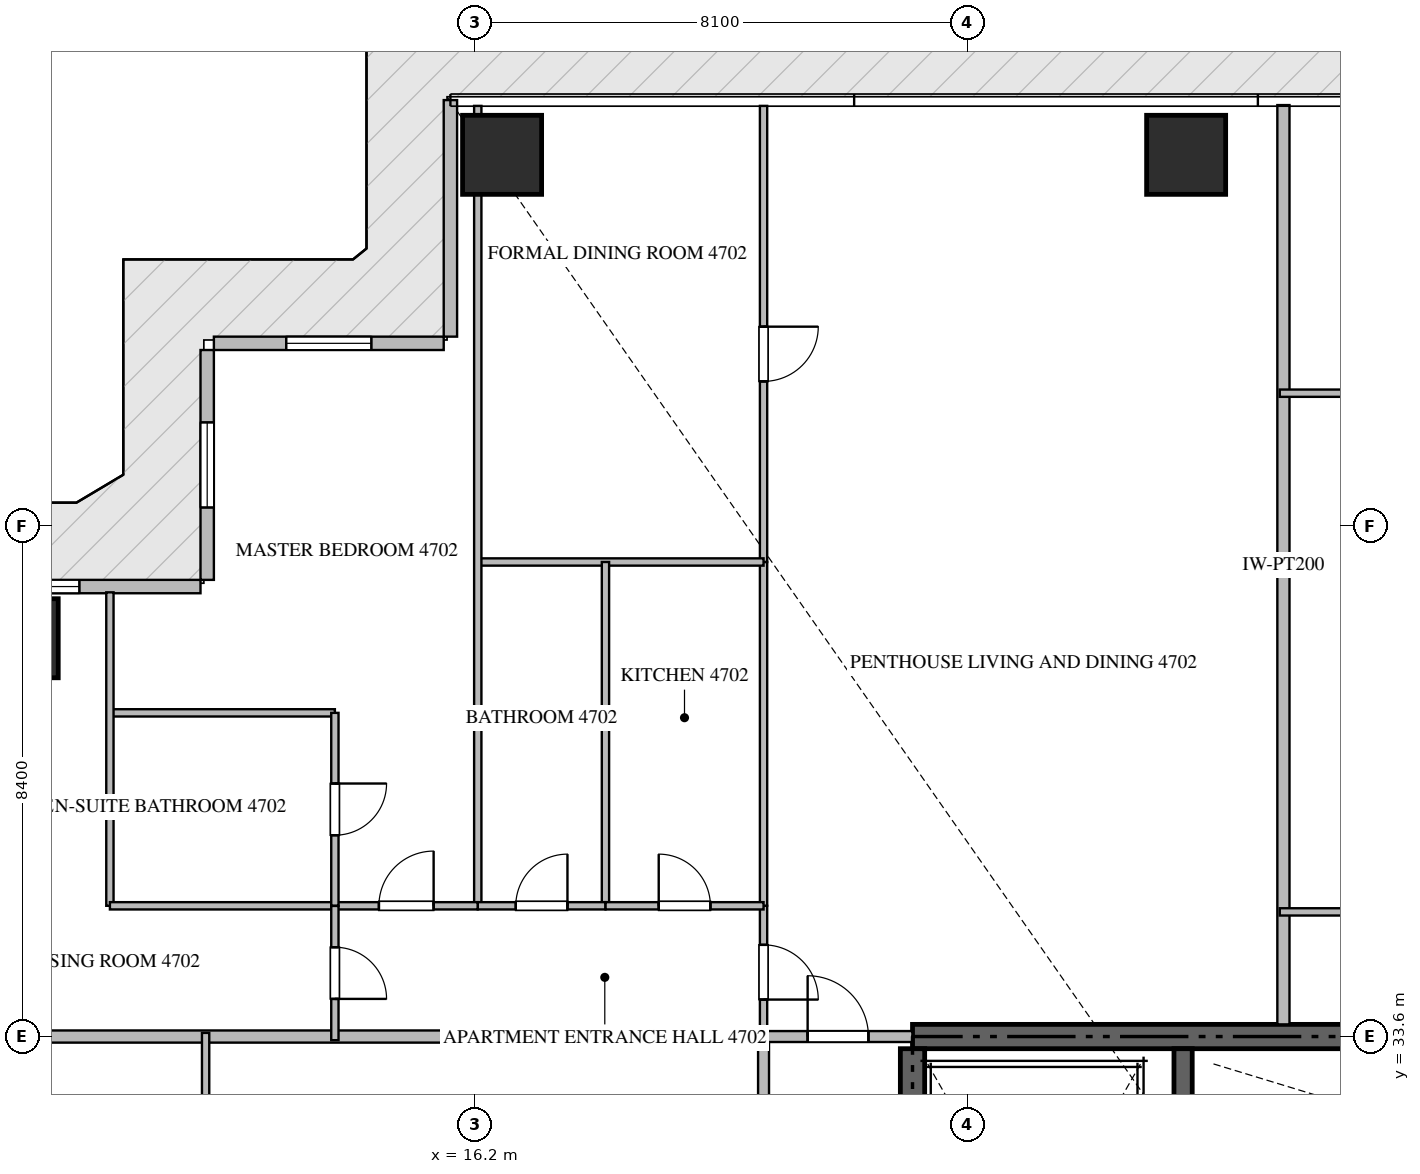
"""IFC4 building model, lengths in metres.
Left out: names, types, materials, properties, quantities, classifications, styles, units other than length and angle.
Written with IfcOpenShell. Run it as: python <this file> out.ifc"""

import sys

from ifc_helpers import new_model, si_unit, direction, frame, frame_2d, origin, origin_2d, place, context, subcontext, project, spatial, rectangle, extrude, source, transform, mapped, element, fill, save


model = new_model("IFC4")
c1 = context("Model", 3, precision=1e-05, world=origin(), true_north=direction((0.0, 1.0)))
c2 = subcontext(c1, "Body", "Model", "MODEL_VIEW")
j1 = project(units=[si_unit("LENGTHUNIT", "METRE"), si_unit("PLANEANGLEUNIT", "RADIAN")], contexts=[c1])
p1 = place(None, origin())
s1 = spatial("IfcSite", under=j1, at=p1, CompositionType="ELEMENT")
p2 = place(p1, origin())
s2 = spatial("IfcBuilding", under=s1, at=p2, CompositionType="ELEMENT")
p3 = place(p2, frame((0.0, 0.0, 187.65)))
s3 = spatial("IfcBuildingStorey", under=s2, at=p3, CompositionType="ELEMENT", Elevation=187.65)
p4 = place(p3, frame((41.4, 33.6, -0.26), z_axis=(0.0, 0.0, 1.0), x_axis=(-1.0, 0.0, 0.0)))
e1 = element("IfcWall", 1, at=p4, inside=s3, PredefinedType="SHEAR", context=c2, shape_type="SweptSolid", body=[
    extrude(rectangle(XDim=18.0, YDim=0.4, at=frame_2d((9.0, 0.0))), origin(), (0.0, 0.0, 1.0), 3.748),
])
p5 = place(p3, frame((23.4, 24.25, -0.26), z_axis=(0.0, 0.0, 1.0), x_axis=(0.0, 1.0, 0.0)))
e2 = element("IfcWall", 2, at=p5, inside=s3, PredefinedType="SHEAR", context=c2, shape_type="SweptSolid", body=[
    extrude(rectangle(XDim=9.15, YDim=0.4, at=frame_2d((4.575, 0.0))), origin(), (0.0, 0.0, 1.0), 3.748),
])
p6 = place(p3, frame((27.85, 23.55, -0.26), z_axis=(0.0, 0.0, 1.0), x_axis=(0.0, 1.0, 0.0)))
e3 = element("IfcWall", 3, at=p6, inside=s3, PredefinedType="SHEAR", context=c2, shape_type="SweptSolid", body=[
    extrude(rectangle(XDim=9.85, YDim=0.3, at=frame_2d((4.925, 0.0))), origin(), (0.0, 0.0, 1.0), 3.748),
])
m1 = source(origin(), c2, "Body", "SweptSolid", [
    extrude(rectangle(XDim=1.3, YDim=1.3, at=origin_2d()), origin(), (0.0, 0.0, 1.0), 3.75),
])
for number, where, z_axis, x_axis in (
    (4, (16.65, 48.1, -0.26), (0.0, 0.0, 1.0), (1.0, 0.0, 0.0)),
    (5, (27.9, 48.1, -0.26), (0.0, 0.0, 1.0), (1.0, 0.0, 0.0)),
    (6, (8.7, 40.15, -0.26), (0.0, 0.0, 1.0), (1.0, 0.0, 0.0)),
):
    element("IfcColumn", number, at=place(p3, frame(where, z_axis=z_axis, x_axis=x_axis)), inside=s3, PredefinedType="COLUMN", context=c2, shape_type="MappedRepresentation", body=[
        mapped(m1, transform((0.0, 0.0, 0.0), scale=1.0)),
    ])
p7 = place(p3, frame((15.8, 49.0, 0.0), z_axis=(0.0, 0.0, 1.0), x_axis=(0.0, -1.0, 0.0)))
e7 = element("IfcWall", 7, at=p7, inside=s3, PredefinedType="ELEMENTEDWALL", context=c2, shape_type="SweptSolid", body=[
    extrude(rectangle(XDim=3.89, YDim=0.22, at=frame_2d((1.945, 0.0))), origin(), (0.0, 0.0, 1.0), 3.475),
])
p8 = place(p3, frame((15.69, 45.0, 0.0), z_axis=(0.0, 0.0, 1.0), x_axis=(-1.0, 0.0, 0.0)))
e8 = element("IfcWall", 8, at=p8, inside=s3, PredefinedType="ELEMENTEDWALL", context=c2, shape_type="SweptSolid", body=[
    extrude(rectangle(XDim=3.78, YDim=0.22, at=frame_2d((1.89, 0.0))), origin(), (0.0, 0.0, 1.0), 3.475),
])
p9 = place(p8, frame((1.19, 0.0, 0.65)))
e9 = element("IfcOpeningElement", 9, at=p9, cuts=e8, PredefinedType="OPENING", context=c2, shape_type="SweptSolid", body=[
    extrude(rectangle(XDim=1.4, YDim=2.05, at=frame_2d((0.7, 1.025))), frame((0.0, 0.12, 0.0), z_axis=(0.0, -1.0, 0.0), x_axis=(1.0, 0.0, 0.0)), (0.0, 0.0, 1.0), 0.24),
])
p10 = place(p3, frame((11.8, 44.89, 0.0), z_axis=(0.0, 0.0, 1.0), x_axis=(0.0, -1.0, 0.0)))
e10 = element("IfcWall", 10, at=p10, inside=s3, PredefinedType="ELEMENTEDWALL", context=c2, shape_type="SweptSolid", body=[
    extrude(rectangle(XDim=3.78, YDim=0.22, at=frame_2d((1.89, 0.0))), origin(), (0.0, 0.0, 1.0), 3.475),
])
p11 = place(p10, frame((1.19, 0.0, 0.65)))
e11 = element("IfcOpeningElement", 11, at=p11, cuts=e10, PredefinedType="OPENING", context=c2, shape_type="SweptSolid", body=[
    extrude(rectangle(XDim=1.4, YDim=2.05, at=frame_2d((0.7, 1.025))), frame((0.0, 0.12, 0.0), z_axis=(0.0, -1.0, 0.0), x_axis=(1.0, 0.0, 0.0)), (0.0, 0.0, 1.0), 0.24),
])
p12 = place(p3, frame((11.69, 41.0, 0.0), z_axis=(0.0, 0.0, 1.0), x_axis=(-1.0, 0.0, 0.0)))
e12 = element("IfcWall", 12, at=p12, inside=s3, PredefinedType="ELEMENTEDWALL", context=c2, shape_type="SweptSolid", body=[
    extrude(rectangle(XDim=3.89, YDim=0.22, at=frame_2d((1.945, 0.0))), origin(), (0.0, 0.0, 1.0), 3.475),
])
p13 = place(p12, frame((1.992, 0.0, 0.65)))
e13 = element("IfcOpeningElement", 13, at=p13, cuts=e12, PredefinedType="OPENING", context=c2, shape_type="SweptSolid", body=[
    extrude(rectangle(XDim=1.4, YDim=2.05, at=frame_2d((0.7, 1.025))), frame((0.0, 0.12, 0.0), z_axis=(0.0, -1.0, 0.0), x_axis=(1.0, 0.0, 0.0)), (0.0, 0.0, 1.0), 0.24),
])
p14 = place(p3, frame((29.5, 33.8, 0.0), z_axis=(0.0, 0.0, 1.0), x_axis=(0.0, 1.0, 0.0)))
e14 = element("IfcWall", 14, at=p14, inside=s3, PredefinedType="PARTITIONING", context=c2, shape_type="SweptSolid", body=[
    extrude(rectangle(XDim=15.118, YDim=0.2, at=frame_2d((7.559, 0.0))), origin(), (0.0, 0.0, 1.0), 3.49),
])
p15 = place(p3, frame((7.882, 33.6, 0.0), z_axis=(0.0, 0.0, 1.0), x_axis=(1.0, 0.0, 0.0)))
e15 = element("IfcWall", 15, at=p15, inside=s3, PredefinedType="PARTITIONING", context=c2, shape_type="SweptSolid", body=[
    extrude(rectangle(XDim=13.068, YDim=0.2, at=frame_2d((6.534, 0.0))), origin(), (0.0, 0.0, 1.0), 3.49),
])
p16 = place(p3, frame((20.95, 14.9, 0.0), z_axis=(0.0, 0.0, 1.0), x_axis=(0.0, 1.0, 0.0)))
e16 = element("IfcWall", 16, at=p16, inside=s3, PredefinedType="PARTITIONING", context=c2, shape_type="SweptSolid", body=[
    extrude(rectangle(XDim=18.7, YDim=0.18, at=frame_2d((9.35, 0.0))), origin(), (0.0, 0.0, 1.0), 3.49),
])
p17 = place(p16, frame((1.805, 0.0, 0.0)))
e17 = element("IfcOpeningElement", 17, at=p17, cuts=e16, PredefinedType="OPENING", context=c2, shape_type="SweptSolid", body=[
    extrude(rectangle(XDim=1.0, YDim=2.15, at=frame_2d((0.5, 1.075))), frame((0.0, 0.1, 0.0), z_axis=(0.0, -1.0, 0.0), x_axis=(1.0, 0.0, 0.0)), (0.0, 0.0, 1.0), 0.2),
])
p18 = place(p3, frame((20.952, 33.6, 0.0), z_axis=(0.0, 0.0, 1.0), x_axis=(1.0, 0.0, 0.0)))
e18 = element("IfcWall", 18, at=p18, inside=s3, PredefinedType="PARTITIONING", context=c2, shape_type="SweptSolid", body=[
    extrude(rectangle(XDim=2.446, YDim=0.18, at=frame_2d((1.223, 0.0))), origin(), (0.0, 0.0, 1.0), 3.49),
])
p19 = place(p18, frame((0.723, 0.0, 0.0)))
e19 = element("IfcOpeningElement", 19, at=p19, cuts=e18, PredefinedType="OPENING", context=c2, shape_type="SweptSolid", body=[
    extrude(rectangle(XDim=1.0, YDim=2.15, at=frame_2d((0.5, 1.075))), frame((0.0, 0.1, 0.0), z_axis=(0.0, -1.0, 0.0), x_axis=(1.0, 0.0, 0.0)), (0.0, 0.0, 1.0), 0.2),
])
p20 = place(p3, frame((20.95, 35.75, 0.0), z_axis=(0.0, 0.0, 1.0), x_axis=(0.0, -1.0, 0.0)))
e20 = element("IfcWall", 20, at=p20, inside=s3, PredefinedType="PARTITIONING", context=c2, shape_type="SweptSolid", body=[
    extrude(rectangle(XDim=2.148, YDim=0.12, at=frame_2d((1.074, 0.0))), origin(), (0.0, 0.0, 1.0), 3.49),
])
p21 = place(p20, frame((0.642, 0.0, 0.0)))
e21 = element("IfcOpeningElement", 21, at=p21, cuts=e20, PredefinedType="OPENING", context=c2, shape_type="SweptSolid", body=[
    extrude(rectangle(XDim=0.9, YDim=2.1, at=frame_2d((0.45, 1.05))), frame((0.0, 0.07, 0.0), z_axis=(0.0, -1.0, 0.0), x_axis=(1.0, 0.0, 0.0)), (0.0, 0.0, 1.0), 0.14),
])
p22 = place(p3, frame((20.95, 48.905, 0.0), z_axis=(0.0, 0.0, 1.0), x_axis=(0.0, -1.0, 0.0)))
e22 = element("IfcWall", 22, at=p22, inside=s3, PredefinedType="PARTITIONING", context=c2, shape_type="SweptSolid", body=[
    extrude(rectangle(XDim=7.501, YDim=0.12, at=frame_2d((3.75, 0.0))), origin(), (0.0, 0.0, 1.0), 3.49),
])
p23 = place(p22, frame((3.631, 0.0, 0.0)))
e23 = element("IfcOpeningElement", 23, at=p23, cuts=e22, PredefinedType="OPENING", context=c2, shape_type="SweptSolid", body=[
    extrude(rectangle(XDim=0.9, YDim=2.1, at=frame_2d((0.45, 1.05))), frame((0.0, 0.07, 0.0), z_axis=(0.0, -1.0, 0.0), x_axis=(1.0, 0.0, 0.0)), (0.0, 0.0, 1.0), 0.14),
])
p24 = place(p3, frame((20.95, 41.402, 0.0), z_axis=(0.0, 0.0, 1.0), x_axis=(0.0, -1.0, 0.0)))
e24 = element("IfcWall", 24, at=p24, inside=s3, PredefinedType="PARTITIONING", context=c2, shape_type="SweptSolid", body=[
    extrude(rectangle(XDim=5.65, YDim=0.12, at=frame_2d((2.825, 0.0))), origin(), (0.0, 0.0, 1.0), 3.49),
])
p25 = place(p3, frame((16.25, 41.404, 0.0), z_axis=(0.0, 0.0, 1.0), x_axis=(1.0, 0.0, 0.0)))
e25 = element("IfcWall", 25, at=p25, inside=s3, PredefinedType="PARTITIONING", context=c2, shape_type="SweptSolid", body=[
    extrude(rectangle(XDim=4.7, YDim=0.12, at=frame_2d((2.35, 0.0))), origin(), (0.0, 0.0, 1.0), 3.49),
])
p26 = place(p3, frame((16.25, 48.905, 0.0), z_axis=(0.0, 0.0, 1.0), x_axis=(0.0, -1.0, 0.0)))
e26 = element("IfcWall", 26, at=p26, inside=s3, PredefinedType="PARTITIONING", context=c2, shape_type="SweptSolid", body=[
    extrude(rectangle(XDim=13.155, YDim=0.12, at=frame_2d((6.578, 0.0))), origin(), (0.0, 0.0, 1.0), 3.49),
])
p27 = place(p3, frame((18.35, 41.404, 0.0), z_axis=(0.0, 0.0, 1.0), x_axis=(0.0, -1.0, 0.0)))
e27 = element("IfcWall", 27, at=p27, inside=s3, PredefinedType="PARTITIONING", context=c2, shape_type="SweptSolid", body=[
    extrude(rectangle(XDim=5.654, YDim=0.12, at=frame_2d((2.827, 0.0))), origin(), (0.0, 0.0, 1.0), 3.49),
])
p28 = place(p3, frame((16.25, 35.75, 0.0), z_axis=(0.0, 0.0, 1.0), x_axis=(1.0, 0.0, 0.0)))
e28 = element("IfcWall", 28, at=p28, inside=s3, PredefinedType="PARTITIONING", context=c2, shape_type="SweptSolid", body=[
    extrude(rectangle(XDim=2.1, YDim=0.12, at=frame_2d((1.05, 0.0))), origin(), (0.0, 0.0, 1.0), 3.49),
])
p29 = place(p28, frame((0.625, 0.0, 0.0)))
e29 = element("IfcOpeningElement", 29, at=p29, cuts=e28, PredefinedType="OPENING", context=c2, shape_type="SweptSolid", body=[
    extrude(rectangle(XDim=0.85, YDim=2.1, at=frame_2d((0.425, 1.05))), frame((0.0, 0.07, 0.0), z_axis=(0.0, -1.0, 0.0), x_axis=(1.0, 0.0, 0.0)), (0.0, 0.0, 1.0), 0.14),
])
p30 = place(p3, frame((18.352, 35.75, 0.0), z_axis=(0.0, 0.0, 1.0), x_axis=(1.0, 0.0, 0.0)))
e30 = element("IfcWall", 30, at=p30, inside=s3, PredefinedType="PARTITIONING", context=c2, shape_type="SweptSolid", body=[
    extrude(rectangle(XDim=2.598, YDim=0.12, at=frame_2d((1.299, 0.0))), origin(), (0.0, 0.0, 1.0), 3.49),
])
p31 = place(p30, frame((0.874, 0.0, 0.0)))
e31 = element("IfcOpeningElement", 31, at=p31, cuts=e30, PredefinedType="OPENING", context=c2, shape_type="SweptSolid", body=[
    extrude(rectangle(XDim=0.85, YDim=2.1, at=frame_2d((0.425, 1.05))), frame((0.0, 0.07, 0.0), z_axis=(0.0, -1.0, 0.0), x_axis=(1.0, 0.0, 0.0)), (0.0, 0.0, 1.0), 0.14),
])
p32 = place(p3, frame((13.9, 35.75, 0.0), z_axis=(0.0, 0.0, 1.0), x_axis=(1.0, 0.0, 0.0)))
e32 = element("IfcWall", 32, at=p32, inside=s3, PredefinedType="PARTITIONING", context=c2, shape_type="SweptSolid", body=[
    extrude(rectangle(XDim=2.348, YDim=0.12, at=frame_2d((1.174, 0.0))), origin(), (0.0, 0.0, 1.0), 3.49),
])
p33 = place(p32, frame((0.724, 0.0, 0.0)))
e33 = element("IfcOpeningElement", 33, at=p33, cuts=e32, PredefinedType="OPENING", context=c2, shape_type="SweptSolid", body=[
    extrude(rectangle(XDim=0.9, YDim=2.1, at=frame_2d((0.45, 1.05))), frame((0.0, 0.07, 0.0), z_axis=(0.0, -1.0, 0.0), x_axis=(1.0, 0.0, 0.0)), (0.0, 0.0, 1.0), 0.14),
])
p34 = place(p3, frame((10.2, 38.923, 0.0), z_axis=(0.0, 0.0, 1.0), x_axis=(1.0, 0.0, 0.0)))
e34 = element("IfcWall", 34, at=p34, inside=s3, PredefinedType="PARTITIONING", context=c2, shape_type="SweptSolid", body=[
    extrude(rectangle(XDim=3.7, YDim=0.12, at=frame_2d((1.85, 0.0))), origin(), (0.0, 0.0, 1.0), 3.49),
])
p35 = place(p3, frame((10.2, 40.905, 0.0), z_axis=(0.0, 0.0, 1.0), x_axis=(0.0, -1.0, 0.0)))
e35 = element("IfcWall", 35, at=p35, inside=s3, PredefinedType="PARTITIONING", context=c2, shape_type="SweptSolid", body=[
    extrude(rectangle(XDim=5.155, YDim=0.12, at=frame_2d((2.578, 0.0))), origin(), (0.0, 0.0, 1.0), 3.49),
])
p36 = place(p3, frame((10.2, 35.75, 0.0), z_axis=(0.0, 0.0, 1.0), x_axis=(1.0, 0.0, 0.0)))
e36 = element("IfcWall", 36, at=p36, inside=s3, PredefinedType="PARTITIONING", context=c2, shape_type="SweptSolid", body=[
    extrude(rectangle(XDim=3.698, YDim=0.12, at=frame_2d((1.849, 0.0))), origin(), (0.0, 0.0, 1.0), 3.49),
])
p37 = place(p3, frame((13.9, 38.923, 0.0), z_axis=(0.0, 0.0, 1.0), x_axis=(0.0, -1.0, 0.0)))
e37 = element("IfcWall", 37, at=p37, inside=s3, PredefinedType="PARTITIONING", context=c2, shape_type="SweptSolid", body=[
    extrude(rectangle(XDim=3.173, YDim=0.12, at=frame_2d((1.586, 0.0))), origin(), (0.0, 0.0, 1.0), 3.49),
])
p38 = place(p37, frame((1.162, 0.0, 0.0)))
e38 = element("IfcOpeningElement", 38, at=p38, cuts=e37, PredefinedType="OPENING", context=c2, shape_type="SweptSolid", body=[
    extrude(rectangle(XDim=0.85, YDim=2.1, at=frame_2d((0.425, 1.05))), frame((0.0, 0.07, 0.0), z_axis=(0.0, -1.0, 0.0), x_axis=(1.0, 0.0, 0.0)), (0.0, 0.0, 1.0), 0.14),
])
p39 = place(p3, frame((13.9, 35.748, 0.0), z_axis=(0.0, 0.0, 1.0), x_axis=(0.0, -1.0, 0.0)))
e39 = element("IfcWall", 39, at=p39, inside=s3, PredefinedType="PARTITIONING", context=c2, shape_type="SweptSolid", body=[
    extrude(rectangle(XDim=2.208, YDim=0.12, at=frame_2d((1.104, 0.0))), origin(), (0.0, 0.0, 1.0), 3.49),
])
p40 = place(p39, frame((0.679, 0.0, 0.0)))
e40 = element("IfcOpeningElement", 40, at=p40, cuts=e39, PredefinedType="OPENING", context=c2, shape_type="SweptSolid", body=[
    extrude(rectangle(XDim=0.85, YDim=2.1, at=frame_2d((0.425, 1.05))), frame((0.0, 0.07, 0.0), z_axis=(0.0, -1.0, 0.0), x_axis=(1.0, 0.0, 0.0)), (0.0, 0.0, 1.0), 0.14),
])
for number, where, z_axis, x_axis in (
    (41, (29.44, 44.18, 0.0), (0.0, 0.0, 1.0), (1.0, 0.0, 0.0)),
    (42, (29.44, 35.65, 0.0), (0.0, 0.0, 1.0), (1.0, 0.0, 0.0)),
):
    element("IfcWall", number, at=place(p3, frame(where, z_axis=z_axis, x_axis=x_axis)), inside=s3, PredefinedType="PARTITIONING", context=c2, shape_type="SweptSolid", body=[
        extrude(rectangle(XDim=9.06, YDim=0.12, at=frame_2d((4.53, 0.0))), origin(), (0.0, 0.0, 1.0), 3.49),
    ])
p41 = place(p3, frame((11.774, 22.6, 0.0), z_axis=(0.0, 0.0, 1.0), x_axis=(0.0, 1.0, 0.0)))
e43 = element("IfcWall", 43, at=p41, inside=s3, PredefinedType="PARTITIONING", context=c2, shape_type="SweptSolid", body=[
    extrude(rectangle(XDim=11.06, YDim=0.12, at=frame_2d((5.53, 0.0))), origin(), (0.0, 0.0, 1.0), 3.49),
])
m2 = source(origin(), c2, "Body", "SweptSolid", [
    extrude(rectangle(XDim=1.4, YDim=2.05, at=frame_2d((0.7, 1.025))), frame((0.0, 0.03, 0.0), z_axis=(0.0, -1.0, 0.0), x_axis=(1.0, 0.0, 0.0)), (0.0, 0.0, 1.0), 0.06),
])
p42 = place(p9, origin())
e44 = element("IfcWindow", 44, at=p42, inside=s3, PartitioningType="SINGLE_PANEL", PredefinedType="WINDOW", context=c2, shape_type="MappedRepresentation", body=[
    mapped(m2, transform((0.0, 0.0, 0.0), scale=1.0)),
])
fill(e9, e44)
p43 = place(p11, origin())
e45 = element("IfcWindow", 45, at=p43, inside=s3, PartitioningType="SINGLE_PANEL", PredefinedType="WINDOW", context=c2, shape_type="MappedRepresentation", body=[
    mapped(m2, transform((0.0, 0.0, 0.0), scale=1.0)),
])
fill(e11, e45)
p44 = place(p13, origin())
e46 = element("IfcWindow", 46, at=p44, inside=s3, PartitioningType="SINGLE_PANEL", PredefinedType="WINDOW", context=c2, shape_type="MappedRepresentation", body=[
    mapped(m2, transform((0.0, 0.0, 0.0), scale=1.0)),
])
fill(e13, e46)
m3 = source(origin(), c2, "Body", "SweptSolid", [
    extrude(rectangle(XDim=1.0, YDim=2.15, at=frame_2d((0.5, 1.075))), frame((0.0, 0.025, 0.0), z_axis=(0.0, -1.0, 0.0), x_axis=(1.0, 0.0, 0.0)), (0.0, 0.0, 1.0), 0.05),
])
p45 = place(p19, origin())
e47 = element("IfcDoor", 47, at=p45, inside=s3, OperationType="SINGLE_SWING_LEFT", PredefinedType="DOOR", context=c2, shape_type="MappedRepresentation", body=[
    mapped(m3, transform((0.0, 0.0, 0.0), scale=1.0)),
])
fill(e19, e47)
m4 = source(origin(), c2, "Body", "SweptSolid", [
    extrude(rectangle(XDim=0.9, YDim=2.1, at=frame_2d((0.45, 1.05))), frame((0.0, 0.025, 0.0), z_axis=(0.0, -1.0, 0.0), x_axis=(1.0, 0.0, 0.0)), (0.0, 0.0, 1.0), 0.05),
])
p46 = place(p21, origin())
e48 = element("IfcDoor", 48, at=p46, inside=s3, OperationType="SINGLE_SWING_RIGHT", PredefinedType="DOOR", context=c2, shape_type="MappedRepresentation", body=[
    mapped(m4, transform((0.0, 0.0, 0.0), scale=1.0)),
])
fill(e21, e48)
p47 = place(p23, origin())
e49 = element("IfcDoor", 49, at=p47, inside=s3, OperationType="SINGLE_SWING_LEFT", PredefinedType="DOOR", context=c2, shape_type="MappedRepresentation", body=[
    mapped(m4, transform((0.0, 0.0, 0.0), scale=1.0)),
])
fill(e23, e49)
m5 = source(origin(), c2, "Body", "SweptSolid", [
    extrude(rectangle(XDim=0.85, YDim=2.1, at=frame_2d((0.425, 1.05))), frame((0.0, 0.025, 0.0), z_axis=(0.0, -1.0, 0.0), x_axis=(1.0, 0.0, 0.0)), (0.0, 0.0, 1.0), 0.05),
])
p48 = place(p29, origin())
e50 = element("IfcDoor", 50, at=p48, inside=s3, OperationType="SINGLE_SWING_RIGHT", PredefinedType="DOOR", context=c2, shape_type="MappedRepresentation", body=[
    mapped(m5, transform((0.0, 0.0, 0.0), scale=1.0)),
])
fill(e29, e50)
p49 = place(p31, origin())
e51 = element("IfcDoor", 51, at=p49, inside=s3, OperationType="SINGLE_SWING_LEFT", PredefinedType="DOOR", context=c2, shape_type="MappedRepresentation", body=[
    mapped(m5, transform((0.0, 0.0, 0.0), scale=1.0)),
])
fill(e31, e51)
p50 = place(p33, origin())
e52 = element("IfcDoor", 52, at=p50, inside=s3, OperationType="SINGLE_SWING_RIGHT", PredefinedType="DOOR", context=c2, shape_type="MappedRepresentation", body=[
    mapped(m4, transform((0.0, 0.0, 0.0), scale=1.0)),
])
fill(e33, e52)
p51 = place(p38, origin())
e53 = element("IfcDoor", 53, at=p51, inside=s3, OperationType="SINGLE_SWING_LEFT", PredefinedType="DOOR", context=c2, shape_type="MappedRepresentation", body=[
    mapped(m5, transform((0.0, 0.0, 0.0), scale=1.0)),
])
fill(e38, e53)
p52 = place(p40, origin())
e54 = element("IfcDoor", 54, at=p52, inside=s3, OperationType="SINGLE_SWING_RIGHT", PredefinedType="DOOR", context=c2, shape_type="MappedRepresentation", body=[
    mapped(m5, transform((0.0, 0.0, 0.0), scale=1.0)),
])
fill(e40, e54)
save(model, sys.argv[1])
